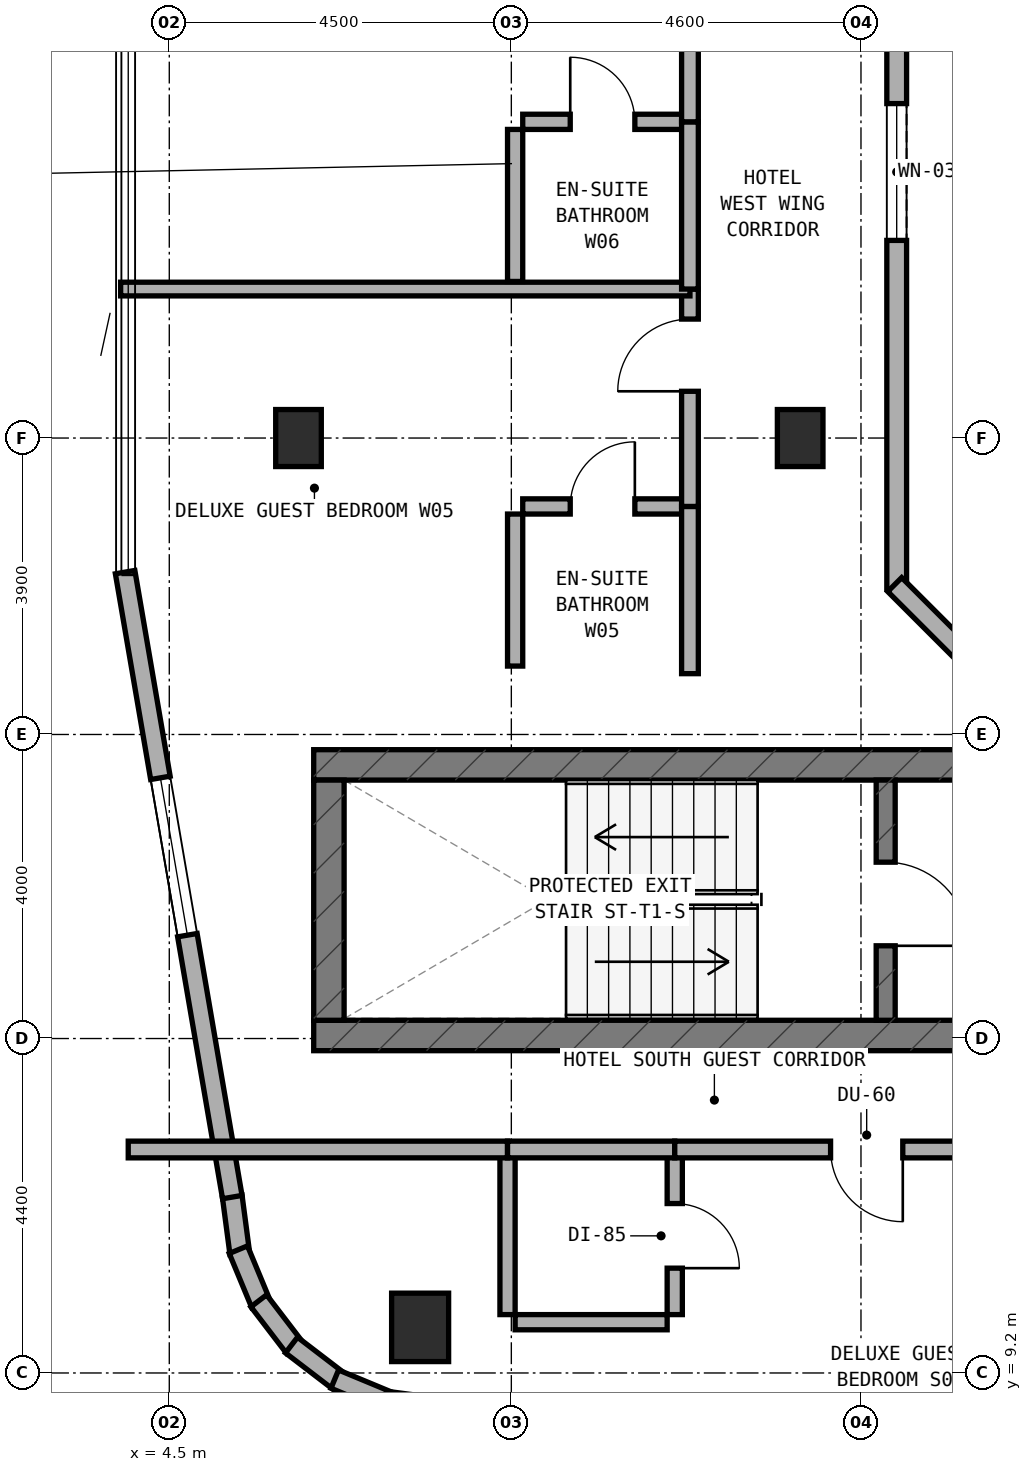
"""IFC4 building model, lengths in metres.
Left out: names, types, materials, properties, quantities, classifications, styles, units other than length and angle.
Written with IfcOpenShell. Run it as: python <this file> out.ifc"""

import sys

from ifc_helpers import new_model, si_unit, direction, frame, frame_2d, origin, origin_2d, place, context, subcontext, project, spatial, rectangle, extrude, element, fill, save


model = new_model("IFC4")
c1 = context("Model", 3, precision=1e-05, world=origin(), true_north=direction((0.0, 1.0)))
c2 = subcontext(c1, "Body", "Model", "MODEL_VIEW")
j1 = project(units=[si_unit("LENGTHUNIT", "METRE"), si_unit("PLANEANGLEUNIT", "RADIAN")], contexts=[c1])
p1 = place(None, origin())
s1 = spatial("IfcSite", under=j1, at=p1, CompositionType="ELEMENT")
p2 = place(p1, origin())
s2 = spatial("IfcBuilding", under=s1, at=p2, CompositionType="ELEMENT")
p3 = place(p2, frame((0.0, 0.0, 257.6)))
s3 = spatial("IfcBuildingStorey", under=s2, at=p3, CompositionType="ELEMENT", Elevation=257.6)
p4 = place(p3, frame((6.4, 13.64, 0.0), z_axis=(0.0, 0.0, 1.0), x_axis=(1.0, 0.0, 0.0)))
e1 = element("IfcWall", 1, at=p4, inside=s3, PredefinedType="SHEAR", context=c2, shape_type="SweptSolid", body=[
    extrude(rectangle(XDim=24.4, YDim=0.4, at=frame_2d((12.2, 0.0))), origin(), (0.0, 0.0, 1.0), 3.6),
])
p5 = place(p4, frame((9.15, 0.0, 0.0)))
e2 = element("IfcOpeningElement", 2, at=p5, cuts=e1, PredefinedType="OPENING", context=c2, shape_type="SweptSolid", body=[
    extrude(rectangle(XDim=1.2, YDim=2.15, at=frame_2d((0.6, 1.075))), frame((0.0, 0.21, 0.0), z_axis=(0.0, -1.0, 0.0), x_axis=(1.0, 0.0, 0.0)), (0.0, 0.0, 1.0), 0.42),
])
p6 = place(p4, frame((16.94, 0.0, 0.0)))
e3 = element("IfcOpeningElement", 3, at=p6, cuts=e1, PredefinedType="OPENING", context=c2, shape_type="SweptSolid", body=[
    extrude(rectangle(XDim=0.85, YDim=2.1, at=frame_2d((0.425, 1.05))), frame((0.0, 0.21, 0.0), z_axis=(0.0, -1.0, 0.0), x_axis=(1.0, 0.0, 0.0)), (0.0, 0.0, 1.0), 0.42),
])
p7 = place(p4, frame((18.783, 0.0, 0.0)))
e4 = element("IfcOpeningElement", 4, at=p7, cuts=e1, PredefinedType="OPENING", context=c2, shape_type="SweptSolid", body=[
    extrude(rectangle(XDim=1.1, YDim=2.15, at=frame_2d((0.55, 1.075))), frame((0.0, 0.21, 0.0), z_axis=(0.0, -1.0, 0.0), x_axis=(1.0, 0.0, 0.0)), (0.0, 0.0, 1.0), 0.42),
])
p8 = place(p4, frame((20.65, 0.0, 0.0)))
e5 = element("IfcOpeningElement", 5, at=p8, cuts=e1, PredefinedType="OPENING", context=c2, shape_type="SweptSolid", body=[
    extrude(rectangle(XDim=1.1, YDim=2.15, at=frame_2d((0.55, 1.075))), frame((0.0, 0.21, 0.0), z_axis=(0.0, -1.0, 0.0), x_axis=(1.0, 0.0, 0.0)), (0.0, 0.0, 1.0), 0.42),
])
p9 = place(p4, frame((22.517, 0.0, 0.0)))
e6 = element("IfcOpeningElement", 6, at=p9, cuts=e1, PredefinedType="OPENING", context=c2, shape_type="SweptSolid", body=[
    extrude(rectangle(XDim=1.1, YDim=2.15, at=frame_2d((0.55, 1.075))), frame((0.0, 0.21, 0.0), z_axis=(0.0, -1.0, 0.0), x_axis=(1.0, 0.0, 0.0)), (0.0, 0.0, 1.0), 0.42),
])
p10 = place(p3, frame((6.4, 17.2, 0.0), z_axis=(0.0, 0.0, 1.0), x_axis=(1.0, 0.0, 0.0)))
e7 = element("IfcWall", 7, at=p10, inside=s3, PredefinedType="SHEAR", context=c2, shape_type="SweptSolid", body=[
    extrude(rectangle(XDim=24.4, YDim=0.4, at=frame_2d((12.2, 0.0))), origin(), (0.0, 0.0, 1.0), 3.6),
])
p11 = place(p3, frame((6.6, 13.84, 0.0), z_axis=(0.0, 0.0, 1.0), x_axis=(0.0, 1.0, 0.0)))
e8 = element("IfcWall", 8, at=p11, inside=s3, PredefinedType="SHEAR", context=c2, shape_type="SweptSolid", body=[
    extrude(rectangle(XDim=3.16, YDim=0.4, at=frame_2d((1.58, 0.0))), origin(), (0.0, 0.0, 1.0), 3.6),
])
p12 = place(p3, frame((13.925, 13.84, 0.0), z_axis=(0.0, 0.0, 1.0), x_axis=(0.0, 1.0, 0.0)))
e9 = element("IfcWall", 9, at=p12, inside=s3, PredefinedType="STANDARD", context=c2, shape_type="SweptSolid", body=[
    extrude(rectangle(XDim=3.16, YDim=0.25, at=frame_2d((1.58, 0.0))), origin(), (0.0, 0.0, 1.0), 3.32),
])
p13 = place(p12, frame((0.98, 0.0, 0.0)))
e10 = element("IfcOpeningElement", 10, at=p13, cuts=e9, PredefinedType="OPENING", context=c2, shape_type="SweptSolid", body=[
    extrude(rectangle(XDim=1.1, YDim=2.15, at=frame_2d((0.55, 1.075))), frame((0.0, 0.135, 0.0), z_axis=(0.0, -1.0, 0.0), x_axis=(1.0, 0.0, 0.0)), (0.0, 0.0, 1.0), 0.27),
])
p14 = place(p3, frame((6.2, 21.5, 0.0), z_axis=(0.0, 0.0, 1.0), x_axis=(1.0, 0.0, 0.0)))
e11 = element("IfcColumn", 11, at=p14, inside=s3, PredefinedType="COLUMN", context=c2, shape_type="SweptSolid", body=[
    extrude(rectangle(XDim=0.6, YDim=0.75, at=origin_2d()), origin(), (0.0, 0.0, 1.0), 3.6),
])
p15 = place(p3, frame((7.8, 9.8, 0.0), z_axis=(0.0, 0.0, 1.0), x_axis=(1.0, 0.0, 0.0)))
e12 = element("IfcColumn", 12, at=p15, inside=s3, PredefinedType="COLUMN", context=c2, shape_type="SweptSolid", body=[
    extrude(rectangle(XDim=0.75, YDim=0.9, at=origin_2d()), origin(), (0.0, 0.0, 1.0), 3.6),
])
p16 = place(p3, frame((12.8, 21.5, 0.0), z_axis=(0.0, 0.0, 1.0), x_axis=(1.0, 0.0, 0.0)))
e13 = element("IfcColumn", 13, at=p16, inside=s3, PredefinedType="COLUMN", context=c2, shape_type="SweptSolid", body=[
    extrude(rectangle(XDim=0.6, YDim=0.75, at=origin_2d()), origin(), (0.0, 0.0, 1.0), 3.6),
])
p17 = place(p3, frame((5.328, 11.525, 0.0), z_axis=(0.0, 0.0, 1.0), x_axis=(0.131190038694, -0.991357238208, 0.0)))
e14 = element("IfcWall", 14, at=p17, inside=s3, PredefinedType="STANDARD", context=c2, shape_type="SweptSolid", body=[
    extrude(rectangle(XDim=0.756, YDim=0.26, at=frame_2d((0.378, 0.0))), origin(), (0.0, 0.0, 1.0), 3.32),
])
p18 = place(p3, frame((5.409, 10.822, 0.0), z_axis=(0.0, 0.0, 1.0), x_axis=(0.383515061956, -0.923534621578, 0.0)))
e15 = element("IfcWall", 15, at=p18, inside=s3, PredefinedType="STANDARD", context=c2, shape_type="SweptSolid", body=[
    extrude(rectangle(XDim=0.772, YDim=0.26, at=frame_2d((0.386, 0.0))), origin(), (0.0, 0.0, 1.0), 3.32),
])
for number, where, z_axis, x_axis in (
    (16, (5.677, 10.149, 0.0), (0.0, 0.0, 1.0), (0.608, -0.794, 0.0)),
    (17, (6.108, 9.567, 0.0), (0.0, 0.0, 1.0), (0.794, -0.608, 0.0)),
    (18, (6.677, 9.119, 0.0), (0.0, 0.0, 1.0), (0.924, -0.383, 0.0)),
):
    element("IfcWall", number, at=place(p3, frame(where, z_axis=z_axis, x_axis=x_axis)), inside=s3, PredefinedType="STANDARD", context=c2, shape_type="SweptSolid", body=[
        extrude(rectangle(XDim=0.772, YDim=0.26, at=frame_2d((0.386, 0.0))), origin(), (0.0, 0.0, 1.0), 3.32),
    ])
p19 = place(p3, frame((7.341, 8.831, 0.0), z_axis=(0.0, 0.0, 1.0), x_axis=(0.991474252313, -0.130302751316, 0.0)))
e19 = element("IfcWall", 19, at=p19, inside=s3, PredefinedType="STANDARD", context=c2, shape_type="SweptSolid", body=[
    extrude(rectangle(XDim=0.791, YDim=0.26, at=frame_2d((0.396, 0.0))), origin(), (0.0, 0.0, 1.0), 3.32),
])
p20 = place(p3, frame((3.919, 19.736, 0.0), z_axis=(0.0, 0.0, 1.0), x_axis=(0.169038545376, -0.985609440994, 0.0)))
e20 = element("IfcWall", 20, at=p20, inside=s3, PredefinedType="STANDARD", context=c2, shape_type="SweptSolid", body=[
    extrude(rectangle(XDim=8.342, YDim=0.26, at=frame_2d((4.171, 0.0))), origin(), (0.0, 0.0, 1.0), 3.32),
])
p21 = place(p20, frame((2.746, 0.0, 0.85)))
e21 = element("IfcOpeningElement", 21, at=p21, cuts=e20, PredefinedType="OPENING", context=c2, shape_type="SweptSolid", body=[
    extrude(rectangle(XDim=2.1, YDim=1.5, at=frame_2d((1.05, 0.75))), frame((0.0, 0.14, 0.0), z_axis=(0.0, -1.0, 0.0), x_axis=(1.0, 0.0, 0.0)), (0.0, 0.0, 1.0), 0.28),
])
p22 = place(p3, frame((14.07, 30.49, 0.0), z_axis=(0.0, 0.0, 1.0), x_axis=(0.0, -1.0, 0.0)))
e22 = element("IfcWall", 22, at=p22, inside=s3, PredefinedType="STANDARD", context=c2, shape_type="SweptSolid", body=[
    extrude(rectangle(XDim=10.98, YDim=0.26, at=frame_2d((5.49, 0.0))), origin(), (0.0, 0.0, 1.0), 3.32),
])
p23 = place(p22, frame((4.59, 0.0, 0.85)))
e23 = element("IfcOpeningElement", 23, at=p23, cuts=e22, PredefinedType="OPENING", context=c2, shape_type="SweptSolid", body=[
    extrude(rectangle(XDim=1.8, YDim=1.5, at=frame_2d((0.9, 0.75))), frame((0.0, 0.14, 0.0), z_axis=(0.0, -1.0, 0.0), x_axis=(1.0, 0.0, 0.0)), (0.0, 0.0, 1.0), 0.28),
])
p24 = place(p3, frame((14.044, 19.572, 0.0), z_axis=(0.0, 0.0, 1.0), x_axis=(0.707106781187, -0.707106781187, 0.0)))
e24 = element("IfcWall", 24, at=p24, inside=s3, PredefinedType="STANDARD", context=c2, shape_type="SweptSolid", body=[
    extrude(rectangle(XDim=2.311, YDim=0.26, at=frame_2d((1.155, 0.0))), origin(), (0.0, 0.0, 1.0), 3.32),
])
p25 = place(p3, frame((11.15, 9.968, 0.0), z_axis=(0.0, 0.0, 1.0), x_axis=(0.0, 1.0, 0.0)))
e25 = element("IfcWall", 25, at=p25, inside=s3, PredefinedType="PLUMBINGWALL", context=c2, shape_type="SweptSolid", body=[
    extrude(rectangle(XDim=2.072, YDim=0.2, at=frame_2d((1.036, 0.0))), origin(), (0.0, 0.0, 1.0), 2.895),
])
p26 = place(p25, frame((0.611, 0.0, 0.0)))
e26 = element("IfcOpeningElement", 26, at=p26, cuts=e25, PredefinedType="OPENING", context=c2, shape_type="SweptSolid", body=[
    extrude(rectangle(XDim=0.85, YDim=2.1, at=frame_2d((0.425, 1.05))), frame((0.0, 0.11, 0.0), z_axis=(0.0, -1.0, 0.0), x_axis=(1.0, 0.0, 0.0)), (0.0, 0.0, 1.0), 0.22),
])
p27 = place(p3, frame((9.05, 9.868, 0.0), z_axis=(0.0, 0.0, 1.0), x_axis=(1.0, 0.0, 0.0)))
e27 = element("IfcWall", 27, at=p27, inside=s3, PredefinedType="PLUMBINGWALL", context=c2, shape_type="SweptSolid", body=[
    extrude(rectangle(XDim=2.0, YDim=0.2, at=frame_2d((1.0, 0.0))), origin(), (0.0, 0.0, 1.0), 3.015),
])
p28 = place(p3, frame((8.95, 9.968, 0.0), z_axis=(0.0, 0.0, 1.0), x_axis=(0.0, 1.0, 0.0)))
e28 = element("IfcWall", 28, at=p28, inside=s3, PredefinedType="PLUMBINGWALL", context=c2, shape_type="SweptSolid", body=[
    extrude(rectangle(XDim=2.072, YDim=0.2, at=frame_2d((1.036, 0.0))), origin(), (0.0, 0.0, 1.0), 2.895),
])
p29 = place(p3, frame((3.96, 12.14, 0.0), z_axis=(0.0, 0.0, 1.0), x_axis=(1.0, 0.0, 0.0)))
e29 = element("IfcWall", 29, at=p29, inside=s3, PredefinedType="SOLIDWALL", context=c2, shape_type="SweptSolid", body=[
    extrude(rectangle(XDim=4.99, YDim=0.22, at=frame_2d((2.495, 0.0))), origin(), (0.0, 0.0, 1.0), 2.795),
])
p30 = place(p3, frame((8.95, 12.14, 0.0), z_axis=(0.0, 0.0, 1.0), x_axis=(1.0, 0.0, 0.0)))
e30 = element("IfcWall", 30, at=p30, inside=s3, PredefinedType="SOLIDWALL", context=c2, shape_type="SweptSolid", body=[
    extrude(rectangle(XDim=2.2, YDim=0.22, at=frame_2d((1.1, 0.0))), origin(), (0.0, 0.0, 1.0), 3.32),
])
p31 = place(p3, frame((11.15, 12.14, 0.0), z_axis=(0.0, 0.0, 1.0), x_axis=(1.0, 0.0, 0.0)))
e31 = element("IfcWall", 31, at=p31, inside=s3, PredefinedType="SOLIDWALL", context=c2, shape_type="SweptSolid", body=[
    extrude(rectangle(XDim=5.05, YDim=0.22, at=frame_2d((2.525, 0.0))), origin(), (0.0, 0.0, 1.0), 2.795),
])
p32 = place(p31, frame((2.05, 0.0, 0.0)))
e32 = element("IfcOpeningElement", 32, at=p32, cuts=e31, PredefinedType="OPENING", context=c2, shape_type="SweptSolid", body=[
    extrude(rectangle(XDim=0.95, YDim=2.1, at=frame_2d((0.475, 1.05))), frame((0.0, 0.12, 0.0), z_axis=(0.0, -1.0, 0.0), x_axis=(1.0, 0.0, 0.0)), (0.0, 0.0, 1.0), 0.24),
])
p33 = place(p3, frame((9.15, 20.6, 0.0), z_axis=(0.0, 0.0, 1.0), x_axis=(1.0, 0.0, 0.0)))
e33 = element("IfcWall", 33, at=p33, inside=s3, PredefinedType="PLUMBINGWALL", context=c2, shape_type="SweptSolid", body=[
    extrude(rectangle(XDim=2.1, YDim=0.2, at=frame_2d((1.05, 0.0))), origin(), (0.0, 0.0, 1.0), 3.32),
])
p34 = place(p33, frame((0.625, 0.0, 0.0)))
e34 = element("IfcOpeningElement", 34, at=p34, cuts=e33, PredefinedType="OPENING", context=c2, shape_type="SweptSolid", body=[
    extrude(rectangle(XDim=0.85, YDim=2.1, at=frame_2d((0.425, 1.05))), frame((0.0, 0.11, 0.0), z_axis=(0.0, -1.0, 0.0), x_axis=(1.0, 0.0, 0.0)), (0.0, 0.0, 1.0), 0.22),
])
p35 = place(p3, frame((9.05, 18.5, 0.0), z_axis=(0.0, 0.0, 1.0), x_axis=(0.0, 1.0, 0.0)))
e35 = element("IfcWall", 35, at=p35, inside=s3, PredefinedType="PLUMBINGWALL", context=c2, shape_type="SweptSolid", body=[
    extrude(rectangle(XDim=2.0, YDim=0.2, at=frame_2d((1.0, 0.0))), origin(), (0.0, 0.0, 1.0), 3.32),
])
p36 = place(p3, frame((11.35, 18.4, 0.0), z_axis=(0.0, 0.0, 1.0), x_axis=(0.0, 1.0, 0.0)))
e36 = element("IfcWall", 36, at=p36, inside=s3, PredefinedType="SOLIDWALL", context=c2, shape_type="SweptSolid", body=[
    extrude(rectangle(XDim=2.2, YDim=0.22, at=frame_2d((1.1, 0.0))), origin(), (0.0, 0.0, 1.0), 3.32),
])
p37 = place(p3, frame((11.35, 20.6, 0.0), z_axis=(0.0, 0.0, 1.0), x_axis=(0.0, 1.0, 0.0)))
e37 = element("IfcWall", 37, at=p37, inside=s3, PredefinedType="SOLIDWALL", context=c2, shape_type="SweptSolid", body=[
    extrude(rectangle(XDim=2.86, YDim=0.22, at=frame_2d((1.43, 0.0))), origin(), (0.0, 0.0, 1.0), 2.795),
])
p38 = place(p37, frame((1.515, 0.0, 0.0)))
e38 = element("IfcOpeningElement", 38, at=p38, cuts=e37, PredefinedType="OPENING", context=c2, shape_type="SweptSolid", body=[
    extrude(rectangle(XDim=0.95, YDim=2.1, at=frame_2d((0.475, 1.05))), frame((0.0, 0.12, 0.0), z_axis=(0.0, -1.0, 0.0), x_axis=(1.0, 0.0, 0.0)), (0.0, 0.0, 1.0), 0.24),
])
p39 = place(p3, frame((3.86, 23.46, 0.0), z_axis=(0.0, 0.0, 1.0), x_axis=(1.0, 0.0, 0.0)))
e39 = element("IfcWall", 39, at=p39, inside=s3, PredefinedType="SOLIDWALL", context=c2, shape_type="SweptSolid", body=[
    extrude(rectangle(XDim=7.49, YDim=0.18, at=frame_2d((3.745, 0.0))), origin(), (0.0, 0.0, 1.0), 3.015),
])
p40 = place(p3, frame((9.15, 25.66, 0.0), z_axis=(0.0, 0.0, 1.0), x_axis=(1.0, 0.0, 0.0)))
e40 = element("IfcWall", 40, at=p40, inside=s3, PredefinedType="PLUMBINGWALL", context=c2, shape_type="SweptSolid", body=[
    extrude(rectangle(XDim=2.1, YDim=0.2, at=frame_2d((1.05, 0.0))), origin(), (0.0, 0.0, 1.0), 3.32),
])
p41 = place(p40, frame((0.625, 0.0, 0.0)))
e41 = element("IfcOpeningElement", 41, at=p41, cuts=e40, PredefinedType="OPENING", context=c2, shape_type="SweptSolid", body=[
    extrude(rectangle(XDim=0.85, YDim=2.1, at=frame_2d((0.425, 1.05))), frame((0.0, 0.11, 0.0), z_axis=(0.0, -1.0, 0.0), x_axis=(1.0, 0.0, 0.0)), (0.0, 0.0, 1.0), 0.22),
])
p42 = place(p3, frame((9.05, 23.56, 0.0), z_axis=(0.0, 0.0, 1.0), x_axis=(0.0, 1.0, 0.0)))
e42 = element("IfcWall", 42, at=p42, inside=s3, PredefinedType="PLUMBINGWALL", context=c2, shape_type="SweptSolid", body=[
    extrude(rectangle(XDim=2.0, YDim=0.2, at=frame_2d((1.0, 0.0))), origin(), (0.0, 0.0, 1.0), 3.32),
])
p43 = place(p3, frame((11.35, 23.46, 0.0), z_axis=(0.0, 0.0, 1.0), x_axis=(0.0, 1.0, 0.0)))
e43 = element("IfcWall", 43, at=p43, inside=s3, PredefinedType="SOLIDWALL", context=c2, shape_type="SweptSolid", body=[
    extrude(rectangle(XDim=2.2, YDim=0.22, at=frame_2d((1.1, 0.0))), origin(), (0.0, 0.0, 1.0), 3.32),
])
p44 = place(p3, frame((11.35, 25.66, 0.0), z_axis=(0.0, 0.0, 1.0), x_axis=(0.0, 1.0, 0.0)))
e44 = element("IfcWall", 44, at=p44, inside=s3, PredefinedType="SOLIDWALL", context=c2, shape_type="SweptSolid", body=[
    extrude(rectangle(XDim=5.94, YDim=0.22, at=frame_2d((2.97, 0.0))), origin(), (0.0, 0.0, 1.0), 2.795),
])
p45 = place(p44, frame((3.645, 0.0, 0.0)))
e45 = element("IfcOpeningElement", 45, at=p45, cuts=e44, PredefinedType="OPENING", context=c2, shape_type="SweptSolid", body=[
    extrude(rectangle(XDim=0.95, YDim=2.1, at=frame_2d((0.475, 1.05))), frame((0.0, 0.12, 0.0), z_axis=(0.0, -1.0, 0.0), x_axis=(1.0, 0.0, 0.0)), (0.0, 0.0, 1.0), 0.24),
])
p46 = place(p21, origin())
e46 = element("IfcWindow", 46, at=p46, inside=s3, PartitioningType="SINGLE_PANEL", PredefinedType="WINDOW", context=c2, shape_type="SweptSolid", body=[
    extrude(rectangle(XDim=2.1, YDim=1.5, at=frame_2d((1.05, 0.75))), frame((0.0, 0.03, 0.0), z_axis=(0.0, -1.0, 0.0), x_axis=(1.0, 0.0, 0.0)), (0.0, 0.0, 1.0), 0.06),
])
fill(e21, e46)
p47 = place(p23, origin())
e47 = element("IfcWindow", 47, at=p47, inside=s3, PartitioningType="SINGLE_PANEL", PredefinedType="WINDOW", context=c2, shape_type="SweptSolid", body=[
    extrude(rectangle(XDim=1.8, YDim=1.5, at=frame_2d((0.9, 0.75))), frame((0.0, 0.03, 0.0), z_axis=(0.0, -1.0, 0.0), x_axis=(1.0, 0.0, 0.0)), (0.0, 0.0, 1.0), 0.06),
])
fill(e23, e47)
p48 = place(p13, frame((1.1, 0.0, 0.0), z_axis=(0.0, 0.0, 1.0), x_axis=(-1.0, 0.0, 0.0)))
e48 = element("IfcDoor", 48, at=p48, inside=s3, OperationType="SINGLE_SWING_RIGHT", PredefinedType="DOOR", context=c2, shape_type="SweptSolid", body=[
    extrude(rectangle(XDim=1.1, YDim=2.15, at=frame_2d((0.55, 1.075))), frame((0.0, 0.025, 0.0), z_axis=(0.0, -1.0, 0.0), x_axis=(1.0, 0.0, 0.0)), (0.0, 0.0, 1.0), 0.05),
])
fill(e10, e48)
p49 = place(p26, frame((0.85, 0.0, 0.0), z_axis=(0.0, 0.0, 1.0), x_axis=(-1.0, 0.0, 0.0)))
e49 = element("IfcDoor", 49, at=p49, inside=s3, OperationType="SINGLE_SWING_RIGHT", PredefinedType="DOOR", context=c2, shape_type="SweptSolid", body=[
    extrude(rectangle(XDim=0.85, YDim=2.1, at=frame_2d((0.425, 1.05))), frame((0.0, 0.025, 0.0), z_axis=(0.0, -1.0, 0.0), x_axis=(1.0, 0.0, 0.0)), (0.0, 0.0, 1.0), 0.05),
])
fill(e26, e49)
p50 = place(p32, frame((0.95, 0.0, 0.0), z_axis=(0.0, 0.0, 1.0), x_axis=(-1.0, 0.0, 0.0)))
e50 = element("IfcDoor", 50, at=p50, inside=s3, OperationType="SINGLE_SWING_LEFT", PredefinedType="DOOR", context=c2, shape_type="SweptSolid", body=[
    extrude(rectangle(XDim=0.95, YDim=2.1, at=frame_2d((0.475, 1.05))), frame((0.0, 0.025, 0.0), z_axis=(0.0, -1.0, 0.0), x_axis=(1.0, 0.0, 0.0)), (0.0, 0.0, 1.0), 0.05),
])
fill(e32, e50)
p51 = place(p34, origin())
e51 = element("IfcDoor", 51, at=p51, inside=s3, OperationType="SINGLE_SWING_RIGHT", PredefinedType="DOOR", context=c2, shape_type="SweptSolid", body=[
    extrude(rectangle(XDim=0.85, YDim=2.1, at=frame_2d((0.425, 1.05))), frame((0.0, 0.025, 0.0), z_axis=(0.0, -1.0, 0.0), x_axis=(1.0, 0.0, 0.0)), (0.0, 0.0, 1.0), 0.05),
])
fill(e34, e51)
p52 = place(p38, origin())
e52 = element("IfcDoor", 52, at=p52, inside=s3, OperationType="SINGLE_SWING_LEFT", PredefinedType="DOOR", context=c2, shape_type="SweptSolid", body=[
    extrude(rectangle(XDim=0.95, YDim=2.1, at=frame_2d((0.475, 1.05))), frame((0.0, 0.025, 0.0), z_axis=(0.0, -1.0, 0.0), x_axis=(1.0, 0.0, 0.0)), (0.0, 0.0, 1.0), 0.05),
])
fill(e38, e52)
p53 = place(p41, origin())
e53 = element("IfcDoor", 53, at=p53, inside=s3, OperationType="SINGLE_SWING_LEFT", PredefinedType="DOOR", context=c2, shape_type="SweptSolid", body=[
    extrude(rectangle(XDim=0.85, YDim=2.1, at=frame_2d((0.425, 1.05))), frame((0.0, 0.025, 0.0), z_axis=(0.0, -1.0, 0.0), x_axis=(1.0, 0.0, 0.0)), (0.0, 0.0, 1.0), 0.05),
])
fill(e41, e53)
save(model, sys.argv[1])
